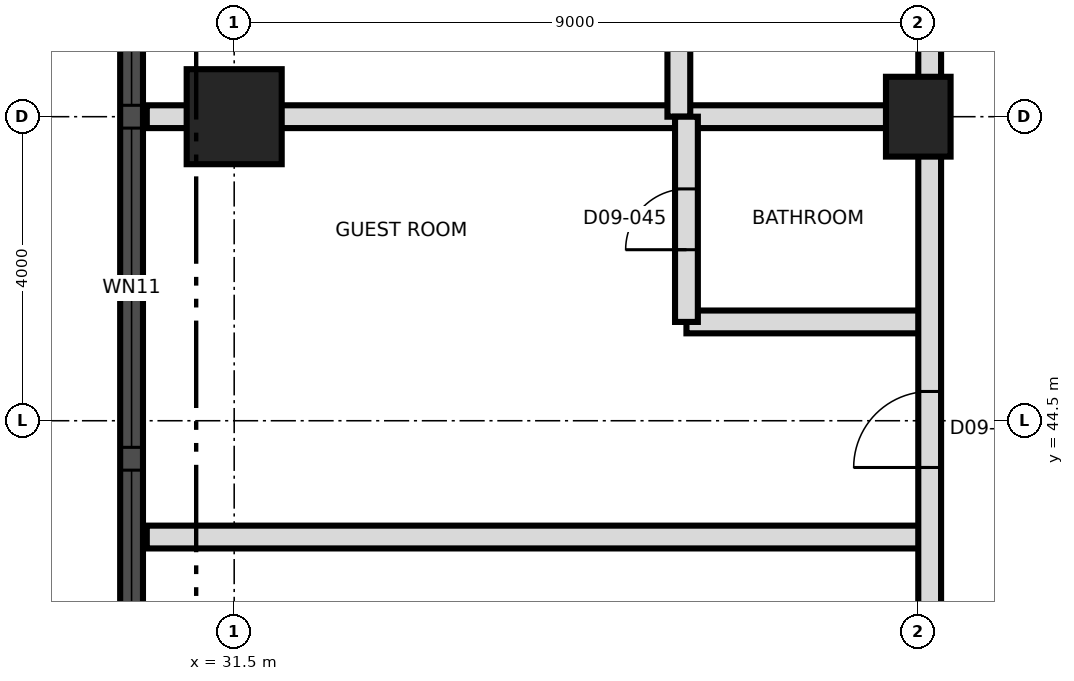
"""IFC4 building model, lengths in metres.
Left out: names, types, materials, properties, quantities, classifications, styles, units other than length and angle.
Written with IfcOpenShell. Run it as: python <this file> out.ifc"""

import sys

from ifc_helpers import new_model, si_unit, direction, frame, frame_2d, origin, origin_2d, place, context, subcontext, project, spatial, rectangle, extrude, element, fill, save


model = new_model("IFC4")
c1 = context("Model", 3, precision=1e-05, world=origin(), true_north=direction((0.0, 1.0)))
c2 = subcontext(c1, "Body", "Model", "MODEL_VIEW")
j1 = project(units=[si_unit("LENGTHUNIT", "METRE"), si_unit("PLANEANGLEUNIT", "RADIAN")], contexts=[c1])
p1 = place(None, origin())
s1 = spatial("IfcSite", under=j1, at=p1, CompositionType="ELEMENT")
p2 = place(p1, origin())
s2 = spatial("IfcBuilding", under=s1, at=p2, CompositionType="ELEMENT")
p3 = place(p2, frame((0.0, 0.0, 109.3)))
s3 = spatial("IfcBuildingStorey", under=s2, at=p3, CompositionType="ELEMENT", Elevation=109.3)
p4 = place(p3, frame((31.5, 48.5, 0.0), z_axis=(0.0, 0.0, 1.0), x_axis=(1.0, 0.0, 0.0)))
e1 = element("IfcColumn", 1, at=p4, inside=s3, PredefinedType="COLUMN", context=c2, shape_type="SweptSolid", body=[
    extrude(rectangle(XDim=1.25, YDim=1.25, at=origin_2d()), origin(), (0.0, 0.0, 1.0), 3.7),
])
p5 = place(p3, frame((40.5, 48.5, 0.0), z_axis=(0.0, 0.0, 1.0), x_axis=(0.0, 1.0, 0.0)))
e2 = element("IfcColumn", 2, at=p5, inside=s3, PredefinedType="COLUMN", context=c2, shape_type="SweptSolid", body=[
    extrude(rectangle(XDim=1.05, YDim=0.85, at=origin_2d()), origin(), (0.0, 0.0, 1.0), 3.7),
])
p6 = place(p3, frame((30.15, 66.992, 0.0), z_axis=(0.0, 0.0, 1.0), x_axis=(0.0, -1.0, 0.0)))
e3 = element("IfcWall", 3, at=p6, inside=s3, PredefinedType="SOLIDWALL", context=c2, shape_type="SweptSolid", body=[
    extrude(rectangle(XDim=32.968, YDim=0.3, at=frame_2d((16.484, 0.0))), origin(), (0.0, 0.0, 1.0), 3.4),
])
p7 = place(p6, frame((1.596, 0.0, 0.3)))
e4 = element("IfcOpeningElement", 4, at=p7, cuts=e3, PredefinedType="OPENING", context=c2, shape_type="SweptSolid", body=[
    extrude(rectangle(XDim=1.8, YDim=2.4, at=frame_2d((0.9, 1.2))), frame((0.0, 0.16, 0.0), z_axis=(0.0, -1.0, 0.0), x_axis=(1.0, 0.0, 0.0)), (0.0, 0.0, 1.0), 0.32),
])
p8 = place(p6, frame((5.142, 0.0, 0.9)))
e5 = element("IfcOpeningElement", 5, at=p8, cuts=e3, PredefinedType="OPENING", context=c2, shape_type="SweptSolid", body=[
    extrude(rectangle(XDim=4.2, YDim=1.5, at=frame_2d((2.1, 0.75))), frame((0.0, 0.16, 0.0), z_axis=(0.0, -1.0, 0.0), x_axis=(1.0, 0.0, 0.0)), (0.0, 0.0, 1.0), 0.32),
])
p9 = place(p6, frame((9.642, 0.0, 0.9)))
e6 = element("IfcOpeningElement", 6, at=p9, cuts=e3, PredefinedType="OPENING", context=c2, shape_type="SweptSolid", body=[
    extrude(rectangle(XDim=4.2, YDim=1.5, at=frame_2d((2.1, 0.75))), frame((0.0, 0.16, 0.0), z_axis=(0.0, -1.0, 0.0), x_axis=(1.0, 0.0, 0.0)), (0.0, 0.0, 1.0), 0.32),
])
p10 = place(p6, frame((14.142, 0.0, 0.9)))
e7 = element("IfcOpeningElement", 7, at=p10, cuts=e3, PredefinedType="OPENING", context=c2, shape_type="SweptSolid", body=[
    extrude(rectangle(XDim=4.2, YDim=1.5, at=frame_2d((2.1, 0.75))), frame((0.0, 0.16, 0.0), z_axis=(0.0, -1.0, 0.0), x_axis=(1.0, 0.0, 0.0)), (0.0, 0.0, 1.0), 0.32),
])
p11 = place(p6, frame((18.642, 0.0, 0.9)))
e8 = element("IfcOpeningElement", 8, at=p11, cuts=e3, PredefinedType="OPENING", context=c2, shape_type="SweptSolid", body=[
    extrude(rectangle(XDim=4.2, YDim=1.5, at=frame_2d((2.1, 0.75))), frame((0.0, 0.16, 0.0), z_axis=(0.0, -1.0, 0.0), x_axis=(1.0, 0.0, 0.0)), (0.0, 0.0, 1.0), 0.32),
])
p12 = place(p6, frame((23.142, 0.0, 0.9)))
e9 = element("IfcOpeningElement", 9, at=p12, cuts=e3, PredefinedType="OPENING", context=c2, shape_type="SweptSolid", body=[
    extrude(rectangle(XDim=4.2, YDim=1.5, at=frame_2d((2.1, 0.75))), frame((0.0, 0.16, 0.0), z_axis=(0.0, -1.0, 0.0), x_axis=(1.0, 0.0, 0.0)), (0.0, 0.0, 1.0), 0.32),
])
p13 = place(p6, frame((29.33, 0.0, 0.3)))
e10 = element("IfcOpeningElement", 10, at=p13, cuts=e3, PredefinedType="OPENING", context=c2, shape_type="SweptSolid", body=[
    extrude(rectangle(XDim=1.8, YDim=2.4, at=frame_2d((0.9, 1.2))), frame((0.0, 0.16, 0.0), z_axis=(0.0, -1.0, 0.0), x_axis=(1.0, 0.0, 0.0)), (0.0, 0.0, 1.0), 0.32),
])
p14 = place(p3, frame((30.35, 42.97, 0.0), z_axis=(0.0, 0.0, 1.0), x_axis=(1.0, 0.0, 0.0)))
e11 = element("IfcWall", 11, at=p14, inside=s3, PredefinedType="PARTITIONING", context=c2, shape_type="SweptSolid", body=[
    extrude(rectangle(XDim=10.3, YDim=0.3, at=frame_2d((5.15, 0.0))), origin(), (0.0, 0.0, 1.0), 3.4),
])
p15 = place(p3, frame((37.45, 45.8, 0.0), z_axis=(0.0, 0.0, 1.0), x_axis=(1.0, 0.0, 0.0)))
e12 = element("IfcWall", 12, at=p15, inside=s3, PredefinedType="PARTITIONING", context=c2, shape_type="SweptSolid", body=[
    extrude(rectangle(XDim=3.2, YDim=0.3, at=frame_2d((1.6, 0.0))), origin(), (0.0, 0.0, 1.0), 3.4),
])
p16 = place(p3, frame((30.35, 48.5, 0.0), z_axis=(0.0, 0.0, 1.0), x_axis=(1.0, 0.0, 0.0)))
e13 = element("IfcWall", 13, at=p16, inside=s3, PredefinedType="PARTITIONING", context=c2, shape_type="SweptSolid", body=[
    extrude(rectangle(XDim=10.3, YDim=0.3, at=frame_2d((5.15, 0.0))), origin(), (0.0, 0.0, 1.0), 3.4),
])
p17 = place(p3, frame((37.35, 48.5, 0.0), z_axis=(0.0, 0.0, 1.0), x_axis=(0.0, 1.0, 0.0)))
e14 = element("IfcWall", 14, at=p17, inside=s3, PredefinedType="PARTITIONING", context=c2, shape_type="SweptSolid", body=[
    extrude(rectangle(XDim=2.7, YDim=0.3, at=frame_2d((1.35, 0.0))), origin(), (0.0, 0.0, 1.0), 3.4),
])
p18 = place(p17, frame((0.95, 0.0, 0.0)))
e15 = element("IfcOpeningElement", 15, at=p18, cuts=e14, PredefinedType="OPENING", context=c2, shape_type="SweptSolid", body=[
    extrude(rectangle(XDim=0.8, YDim=2.1, at=frame_2d((0.4, 1.05))), frame((0.0, 0.16, 0.0), z_axis=(0.0, -1.0, 0.0), x_axis=(1.0, 0.0, 0.0)), (0.0, 0.0, 1.0), 0.32),
])
p19 = place(p3, frame((37.45, 45.8, 0.0), z_axis=(0.0, 0.0, 1.0), x_axis=(0.0, 1.0, 0.0)))
e16 = element("IfcWall", 16, at=p19, inside=s3, PredefinedType="PARTITIONING", context=c2, shape_type="SweptSolid", body=[
    extrude(rectangle(XDim=2.7, YDim=0.3, at=frame_2d((1.35, 0.0))), origin(), (0.0, 0.0, 1.0), 3.4),
])
p20 = place(p19, frame((0.95, 0.0, 0.0)))
e17 = element("IfcOpeningElement", 17, at=p20, cuts=e16, PredefinedType="OPENING", context=c2, shape_type="SweptSolid", body=[
    extrude(rectangle(XDim=0.8, YDim=2.1, at=frame_2d((0.4, 1.05))), frame((0.0, 0.16, 0.0), z_axis=(0.0, -1.0, 0.0), x_axis=(1.0, 0.0, 0.0)), (0.0, 0.0, 1.0), 0.32),
])
p21 = place(p3, frame((40.65, 39.8, 0.0), z_axis=(0.0, 0.0, 1.0), x_axis=(0.0, 1.0, 0.0)))
e18 = element("IfcWall", 18, at=p21, inside=s3, PredefinedType="PARTITIONING", context=c2, shape_type="SweptSolid", body=[
    extrude(rectangle(XDim=37.09, YDim=0.3, at=frame_2d((18.545, 0.0))), origin(), (0.0, 0.0, 1.0), 3.4),
])
p22 = place(p21, frame((0.835, 0.0, 0.0)))
e19 = element("IfcOpeningElement", 19, at=p22, cuts=e18, PredefinedType="OPENING", context=c2, shape_type="SweptSolid", body=[
    extrude(rectangle(XDim=1.2, YDim=2.1, at=frame_2d((0.6, 1.05))), frame((0.0, 0.16, 0.0), z_axis=(0.0, -1.0, 0.0), x_axis=(1.0, 0.0, 0.0)), (0.0, 0.0, 1.0), 0.32),
])
p23 = place(p21, frame((4.085, 0.0, 0.0)))
e20 = element("IfcOpeningElement", 20, at=p23, cuts=e18, PredefinedType="OPENING", context=c2, shape_type="SweptSolid", body=[
    extrude(rectangle(XDim=1.0, YDim=2.1, at=frame_2d((0.5, 1.05))), frame((0.0, 0.16, 0.0), z_axis=(0.0, -1.0, 0.0), x_axis=(1.0, 0.0, 0.0)), (0.0, 0.0, 1.0), 0.32),
])
p24 = place(p21, frame((11.62, 0.0, 0.0)))
e21 = element("IfcOpeningElement", 21, at=p24, cuts=e18, PredefinedType="OPENING", context=c2, shape_type="SweptSolid", body=[
    extrude(rectangle(XDim=1.0, YDim=2.4, at=frame_2d((0.5, 1.2))), frame((0.0, 0.16, 0.0), z_axis=(0.0, -1.0, 0.0), x_axis=(1.0, 0.0, 0.0)), (0.0, 0.0, 1.0), 0.32),
])
p25 = place(p21, frame((13.27, 0.0, 0.0)))
e22 = element("IfcOpeningElement", 22, at=p25, cuts=e18, PredefinedType="OPENING", context=c2, shape_type="SweptSolid", body=[
    extrude(rectangle(XDim=1.0, YDim=2.4, at=frame_2d((0.5, 1.2))), frame((0.0, 0.16, 0.0), z_axis=(0.0, -1.0, 0.0), x_axis=(1.0, 0.0, 0.0)), (0.0, 0.0, 1.0), 0.32),
])
p26 = place(p21, frame((21.2, 0.0, 0.0)))
e23 = element("IfcOpeningElement", 23, at=p26, cuts=e18, PredefinedType="OPENING", context=c2, shape_type="SweptSolid", body=[
    extrude(rectangle(XDim=1.0, YDim=2.4, at=frame_2d((0.5, 1.2))), frame((0.0, 0.16, 0.0), z_axis=(0.0, -1.0, 0.0), x_axis=(1.0, 0.0, 0.0)), (0.0, 0.0, 1.0), 0.32),
])
p27 = place(p10, origin())
e24 = element("IfcWindow", 24, at=p27, inside=s3, PartitioningType="SINGLE_PANEL", PredefinedType="WINDOW", context=c2, shape_type="SweptSolid", body=[
    extrude(rectangle(XDim=4.2, YDim=1.5, at=frame_2d((2.1, 0.75))), frame((0.0, 0.03, 0.0), z_axis=(0.0, -1.0, 0.0), x_axis=(1.0, 0.0, 0.0)), (0.0, 0.0, 1.0), 0.06),
])
fill(e7, e24)
p28 = place(p11, origin())
e25 = element("IfcWindow", 25, at=p28, inside=s3, PartitioningType="SINGLE_PANEL", PredefinedType="WINDOW", context=c2, shape_type="SweptSolid", body=[
    extrude(rectangle(XDim=4.2, YDim=1.5, at=frame_2d((2.1, 0.75))), frame((0.0, 0.03, 0.0), z_axis=(0.0, -1.0, 0.0), x_axis=(1.0, 0.0, 0.0)), (0.0, 0.0, 1.0), 0.06),
])
fill(e8, e25)
p29 = place(p12, origin())
e26 = element("IfcWindow", 26, at=p29, inside=s3, PartitioningType="SINGLE_PANEL", PredefinedType="WINDOW", context=c2, shape_type="SweptSolid", body=[
    extrude(rectangle(XDim=4.2, YDim=1.5, at=frame_2d((2.1, 0.75))), frame((0.0, 0.03, 0.0), z_axis=(0.0, -1.0, 0.0), x_axis=(1.0, 0.0, 0.0)), (0.0, 0.0, 1.0), 0.06),
])
fill(e9, e26)
p30 = place(p20, origin())
e27 = element("IfcDoor", 27, at=p30, inside=s3, OperationType="SINGLE_SWING_LEFT", PredefinedType="DOOR", context=c2, shape_type="SweptSolid", body=[
    extrude(rectangle(XDim=0.8, YDim=2.1, at=frame_2d((0.4, 1.05))), frame((0.0, 0.025, 0.0), z_axis=(0.0, -1.0, 0.0), x_axis=(1.0, 0.0, 0.0)), (0.0, 0.0, 1.0), 0.05),
])
fill(e17, e27)
p31 = place(p23, origin())
e28 = element("IfcDoor", 28, at=p31, inside=s3, OperationType="SINGLE_SWING_LEFT", PredefinedType="DOOR", context=c2, shape_type="SweptSolid", body=[
    extrude(rectangle(XDim=1.0, YDim=2.1, at=frame_2d((0.5, 1.05))), frame((0.0, 0.025, 0.0), z_axis=(0.0, -1.0, 0.0), x_axis=(1.0, 0.0, 0.0)), (0.0, 0.0, 1.0), 0.05),
])
fill(e20, e28)
save(model, sys.argv[1])
